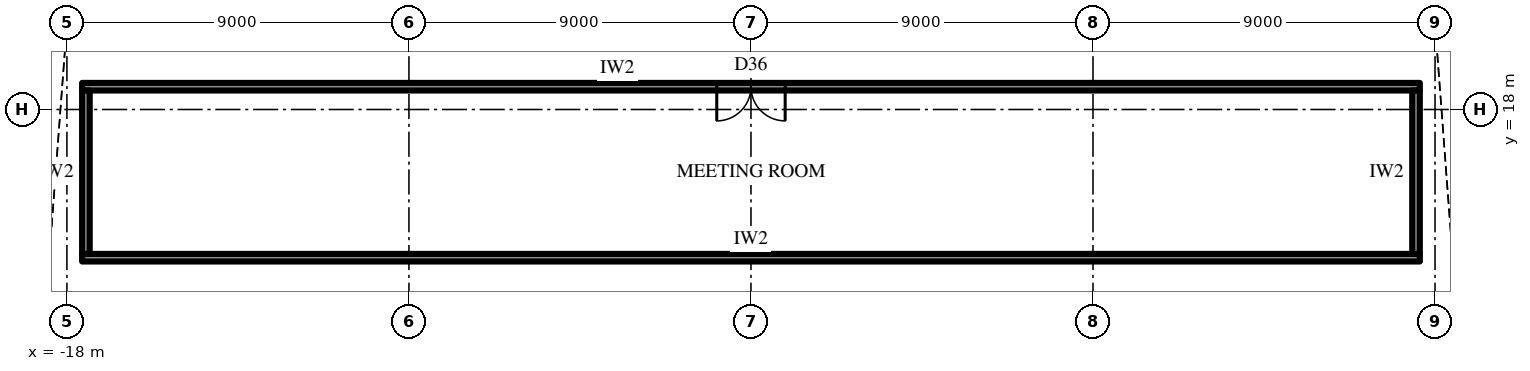
"""IFC4 building model, lengths in metres.
Left out: names, types, materials, properties, quantities, classifications, styles, units other than length and angle.
Written with IfcOpenShell. Run it as: python <this file> out.ifc"""

import sys

from ifc_helpers import new_model, si_unit, direction, frame, frame_2d, origin, place, context, subcontext, project, spatial, rectangle, extrude, element, fill, save


model = new_model("IFC4")
c1 = context("Model", 3, precision=1e-05, world=origin(), true_north=direction((0.0, 1.0)))
c2 = subcontext(c1, "Body", "Model", "MODEL_VIEW")
j1 = project(units=[si_unit("LENGTHUNIT", "METRE"), si_unit("PLANEANGLEUNIT", "RADIAN")], contexts=[c1])
p1 = place(None, origin())
s1 = spatial("IfcSite", under=j1, at=p1, CompositionType="ELEMENT")
p2 = place(p1, origin())
s2 = spatial("IfcBuilding", under=s1, at=p2, CompositionType="ELEMENT")
p3 = place(p2, frame((0.0, 0.0, 178.3)))
s3 = spatial("IfcBuildingStorey", under=s2, at=p3, CompositionType="ELEMENT", Elevation=178.3)
p4 = place(p3, frame((-17.6, 14.1, 0.0), z_axis=(0.0, 0.0, 1.0), x_axis=(1.0, 0.0, 0.0)))
e1 = element("IfcWall", 1, at=p4, inside=s3, PredefinedType="PARTITIONING", context=c2, shape_type="SweptSolid", body=[
    extrude(rectangle(XDim=35.2, YDim=0.2, at=frame_2d((17.6, 0.0))), origin(), (0.0, 0.0, 1.0), 4.0),
])
p5 = place(p3, frame((-17.6, 18.6, 0.0), z_axis=(0.0, 0.0, 1.0), x_axis=(1.0, 0.0, 0.0)))
e2 = element("IfcWall", 2, at=p5, inside=s3, PredefinedType="PARTITIONING", context=c2, shape_type="SweptSolid", body=[
    extrude(rectangle(XDim=35.2, YDim=0.2, at=frame_2d((17.6, 0.0))), origin(), (0.0, 0.0, 1.0), 4.0),
])
p6 = place(p5, frame((16.7, 0.0, 0.0)))
e3 = element("IfcOpeningElement", 3, at=p6, cuts=e2, PredefinedType="OPENING", context=c2, shape_type="SweptSolid", body=[
    extrude(rectangle(XDim=1.8, YDim=2.4, at=frame_2d((0.9, 1.2))), frame((0.0, 0.11, 0.0), z_axis=(0.0, -1.0, 0.0), x_axis=(1.0, 0.0, 0.0)), (0.0, 0.0, 1.0), 0.22),
])
for number, where, z_axis, x_axis in (
    (4, (-17.5, 14.2, 0.0), (0.0, 0.0, 1.0), (0.0, 1.0, 0.0)),
    (5, (17.5, 14.2, 0.0), (0.0, 0.0, 1.0), (0.0, 1.0, 0.0)),
):
    element("IfcWall", number, at=place(p3, frame(where, z_axis=z_axis, x_axis=x_axis)), inside=s3, PredefinedType="PARTITIONING", context=c2, shape_type="SweptSolid", body=[
        extrude(rectangle(XDim=4.3, YDim=0.2, at=frame_2d((2.15, 0.0))), origin(), (0.0, 0.0, 1.0), 4.0),
    ])
p7 = place(p6, frame((1.8, 0.0, 0.0), z_axis=(0.0, 0.0, 1.0), x_axis=(-1.0, 0.0, 0.0)))
e6 = element("IfcDoor", 6, at=p7, inside=s3, OperationType="DOUBLE_DOOR_SINGLE_SWING", PredefinedType="DOOR", context=c2, shape_type="SweptSolid", body=[
    extrude(rectangle(XDim=1.8, YDim=2.4, at=frame_2d((0.9, 1.2))), frame((0.0, 0.025, 0.0), z_axis=(0.0, -1.0, 0.0), x_axis=(1.0, 0.0, 0.0)), (0.0, 0.0, 1.0), 0.05),
])
fill(e3, e6)
save(model, sys.argv[1])
